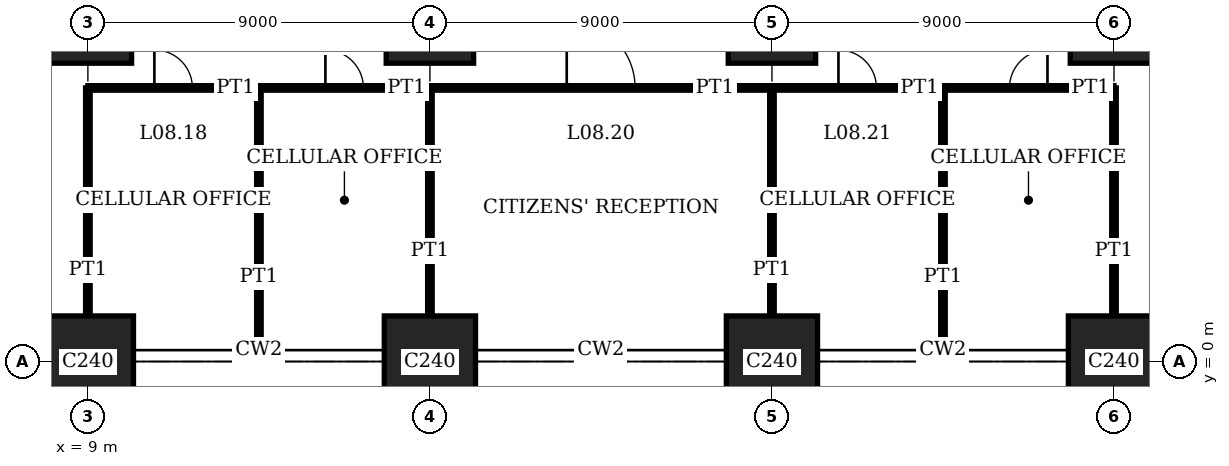
"""IFC4 building model, lengths in metres.
Left out: names, types, materials, properties, quantities, classifications, styles, units other than length and angle.
Written with IfcOpenShell. Run it as: python <this file> out.ifc"""

import sys

from ifc_helpers import new_model, si_unit, direction, frame, frame_2d, origin, origin_2d, place, context, subcontext, project, spatial, rectangle, extrude, element, fill, save


model = new_model("IFC4")
c1 = context("Model", 3, precision=1e-05, world=origin(), true_north=direction((0.0, 1.0)))
c2 = subcontext(c1, "Body", "Model", "MODEL_VIEW")
j1 = project(units=[si_unit("LENGTHUNIT", "METRE"), si_unit("PLANEANGLEUNIT", "RADIAN")], contexts=[c1])
p1 = place(None, origin())
s1 = spatial("IfcSite", under=j1, at=p1, CompositionType="ELEMENT")
p2 = place(p1, origin())
s2 = spatial("IfcBuilding", under=s1, at=p2, CompositionType="ELEMENT")
p3 = place(p2, frame((0.0, 0.0, 35.8)))
s3 = spatial("IfcBuildingStorey", under=s2, at=p3, CompositionType="ELEMENT", Elevation=35.8)
p4 = place(p3, frame((9.0, 0.0, 0.0), z_axis=(0.0, 0.0, 1.0), x_axis=(1.0, 0.0, 0.0)))
e1 = element("IfcColumn", 1, at=p4, inside=s3, PredefinedType="COLUMN", context=c2, shape_type="SweptSolid", body=[
    extrude(rectangle(XDim=2.4, YDim=2.4, at=origin_2d()), origin(), (0.0, 0.0, 1.0), 4.0),
])
p5 = place(p3, frame((9.0, 9.0, 0.0), z_axis=(0.0, 0.0, 1.0), x_axis=(1.0, 0.0, 0.0)))
e2 = element("IfcColumn", 2, at=p5, inside=s3, PredefinedType="COLUMN", context=c2, shape_type="SweptSolid", body=[
    extrude(rectangle(XDim=2.3, YDim=2.3, at=origin_2d()), origin(), (0.0, 0.0, 1.0), 4.0),
])
p6 = place(p3, frame((18.0, 0.0, 0.0), z_axis=(0.0, 0.0, 1.0), x_axis=(1.0, 0.0, 0.0)))
e3 = element("IfcColumn", 3, at=p6, inside=s3, PredefinedType="COLUMN", context=c2, shape_type="SweptSolid", body=[
    extrude(rectangle(XDim=2.4, YDim=2.4, at=origin_2d()), origin(), (0.0, 0.0, 1.0), 4.0),
])
p7 = place(p3, frame((18.0, 9.0, 0.0), z_axis=(0.0, 0.0, 1.0), x_axis=(1.0, 0.0, 0.0)))
e4 = element("IfcColumn", 4, at=p7, inside=s3, PredefinedType="COLUMN", context=c2, shape_type="SweptSolid", body=[
    extrude(rectangle(XDim=2.3, YDim=2.3, at=origin_2d()), origin(), (0.0, 0.0, 1.0), 4.0),
])
p8 = place(p3, frame((27.0, 0.0, 0.0), z_axis=(0.0, 0.0, 1.0), x_axis=(1.0, 0.0, 0.0)))
e5 = element("IfcColumn", 5, at=p8, inside=s3, PredefinedType="COLUMN", context=c2, shape_type="SweptSolid", body=[
    extrude(rectangle(XDim=2.4, YDim=2.4, at=origin_2d()), origin(), (0.0, 0.0, 1.0), 4.0),
])
p9 = place(p3, frame((27.0, 9.0, 0.0), z_axis=(0.0, 0.0, 1.0), x_axis=(1.0, 0.0, 0.0)))
e6 = element("IfcColumn", 6, at=p9, inside=s3, PredefinedType="COLUMN", context=c2, shape_type="SweptSolid", body=[
    extrude(rectangle(XDim=2.3, YDim=2.3, at=origin_2d()), origin(), (0.0, 0.0, 1.0), 4.0),
])
p10 = place(p3, frame((36.0, 0.0, 0.0), z_axis=(0.0, 0.0, 1.0), x_axis=(1.0, 0.0, 0.0)))
e7 = element("IfcColumn", 7, at=p10, inside=s3, PredefinedType="COLUMN", context=c2, shape_type="SweptSolid", body=[
    extrude(rectangle(XDim=2.4, YDim=2.4, at=origin_2d()), origin(), (0.0, 0.0, 1.0), 4.0),
])
p11 = place(p3, frame((36.0, 9.0, 0.0), z_axis=(0.0, 0.0, 1.0), x_axis=(1.0, 0.0, 0.0)))
e8 = element("IfcColumn", 8, at=p11, inside=s3, PredefinedType="COLUMN", context=c2, shape_type="SweptSolid", body=[
    extrude(rectangle(XDim=2.3, YDim=2.3, at=origin_2d()), origin(), (0.0, 0.0, 1.0), 4.0),
])
p12 = place(p3, frame((9.0, 7.2, 0.0), z_axis=(0.0, 0.0, 1.0), x_axis=(1.0, 0.0, 0.0)))
e9 = element("IfcWall", 9, at=p12, inside=s3, PredefinedType="PARTITIONING", context=c2, shape_type="SweptSolid", body=[
    extrude(rectangle(XDim=4.5, YDim=0.12, at=frame_2d((2.25, 0.0))), origin(), (0.0, 0.0, 1.0), 3.75),
])
p13 = place(p12, frame((1.75, 0.0, 0.0)))
e10 = element("IfcOpeningElement", 10, at=p13, cuts=e9, PredefinedType="OPENING", context=c2, shape_type="SweptSolid", body=[
    extrude(rectangle(XDim=1.0, YDim=2.4, at=frame_2d((0.5, 1.2))), frame((0.0, 0.07, 0.0), z_axis=(0.0, -1.0, 0.0), x_axis=(1.0, 0.0, 0.0)), (0.0, 0.0, 1.0), 0.14),
])
p14 = place(p3, frame((13.5, 7.2, 0.0), z_axis=(0.0, 0.0, 1.0), x_axis=(1.0, 0.0, 0.0)))
e11 = element("IfcWall", 11, at=p14, inside=s3, PredefinedType="PARTITIONING", context=c2, shape_type="SweptSolid", body=[
    extrude(rectangle(XDim=4.5, YDim=0.12, at=frame_2d((2.25, 0.0))), origin(), (0.0, 0.0, 1.0), 3.75),
])
p15 = place(p14, frame((1.75, 0.0, 0.0)))
e12 = element("IfcOpeningElement", 12, at=p15, cuts=e11, PredefinedType="OPENING", context=c2, shape_type="SweptSolid", body=[
    extrude(rectangle(XDim=1.0, YDim=2.4, at=frame_2d((0.5, 1.2))), frame((0.0, 0.07, 0.0), z_axis=(0.0, -1.0, 0.0), x_axis=(1.0, 0.0, 0.0)), (0.0, 0.0, 1.0), 0.14),
])
p16 = place(p3, frame((18.0, 7.2, 0.0), z_axis=(0.0, 0.0, 1.0), x_axis=(1.0, 0.0, 0.0)))
e13 = element("IfcWall", 13, at=p16, inside=s3, PredefinedType="PARTITIONING", context=c2, shape_type="SweptSolid", body=[
    extrude(rectangle(XDim=9.0, YDim=0.12, at=frame_2d((4.5, 0.0))), origin(), (0.0, 0.0, 1.0), 3.75),
])
p17 = place(p16, frame((3.6, 0.0, 0.0)))
e14 = element("IfcOpeningElement", 14, at=p17, cuts=e13, PredefinedType="OPENING", context=c2, shape_type="SweptSolid", body=[
    extrude(rectangle(XDim=1.8, YDim=2.4, at=frame_2d((0.9, 1.2))), frame((0.0, 0.07, 0.0), z_axis=(0.0, -1.0, 0.0), x_axis=(1.0, 0.0, 0.0)), (0.0, 0.0, 1.0), 0.14),
])
p18 = place(p3, frame((27.0, 7.2, 0.0), z_axis=(0.0, 0.0, 1.0), x_axis=(1.0, 0.0, 0.0)))
e15 = element("IfcWall", 15, at=p18, inside=s3, PredefinedType="PARTITIONING", context=c2, shape_type="SweptSolid", body=[
    extrude(rectangle(XDim=4.5, YDim=0.12, at=frame_2d((2.25, 0.0))), origin(), (0.0, 0.0, 1.0), 3.75),
])
p19 = place(p18, frame((1.75, 0.0, 0.0)))
e16 = element("IfcOpeningElement", 16, at=p19, cuts=e15, PredefinedType="OPENING", context=c2, shape_type="SweptSolid", body=[
    extrude(rectangle(XDim=1.0, YDim=2.4, at=frame_2d((0.5, 1.2))), frame((0.0, 0.07, 0.0), z_axis=(0.0, -1.0, 0.0), x_axis=(1.0, 0.0, 0.0)), (0.0, 0.0, 1.0), 0.14),
])
p20 = place(p3, frame((31.5, 7.2, 0.0), z_axis=(0.0, 0.0, 1.0), x_axis=(1.0, 0.0, 0.0)))
e17 = element("IfcWall", 17, at=p20, inside=s3, PredefinedType="PARTITIONING", context=c2, shape_type="SweptSolid", body=[
    extrude(rectangle(XDim=4.5, YDim=0.12, at=frame_2d((2.25, 0.0))), origin(), (0.0, 0.0, 1.0), 3.75),
])
p21 = place(p20, frame((1.75, 0.0, 0.0)))
e18 = element("IfcOpeningElement", 18, at=p21, cuts=e17, PredefinedType="OPENING", context=c2, shape_type="SweptSolid", body=[
    extrude(rectangle(XDim=1.0, YDim=2.4, at=frame_2d((0.5, 1.2))), frame((0.0, 0.07, 0.0), z_axis=(0.0, -1.0, 0.0), x_axis=(1.0, 0.0, 0.0)), (0.0, 0.0, 1.0), 0.14),
])
p22 = place(p3, frame((9.0, 1.2, 0.0), z_axis=(0.0, 0.0, 1.0), x_axis=(0.0, 1.0, 0.0)))
e19 = element("IfcWall", 19, at=p22, inside=s3, PredefinedType="PARTITIONING", context=c2, shape_type="SweptSolid", body=[
    extrude(rectangle(XDim=6.0, YDim=0.12, at=frame_2d((3.0, 0.0))), origin(), (0.0, 0.0, 1.0), 3.05),
])
p23 = place(p3, frame((13.5, 0.31, 0.0), z_axis=(0.0, 0.0, 1.0), x_axis=(0.0, 1.0, 0.0)))
e20 = element("IfcWall", 20, at=p23, inside=s3, PredefinedType="PARTITIONING", context=c2, shape_type="SweptSolid", body=[
    extrude(rectangle(XDim=6.89, YDim=0.12, at=frame_2d((3.445, 0.0))), origin(), (0.0, 0.0, 1.0), 3.75),
])
for number, where, z_axis, x_axis in (
    (21, (18.0, 1.2, 0.0), (0.0, 0.0, 1.0), (0.0, 1.0, 0.0)),
    (22, (27.0, 1.2, 0.0), (0.0, 0.0, 1.0), (0.0, 1.0, 0.0)),
):
    element("IfcWall", number, at=place(p3, frame(where, z_axis=z_axis, x_axis=x_axis)), inside=s3, PredefinedType="PARTITIONING", context=c2, shape_type="SweptSolid", body=[
        extrude(rectangle(XDim=6.0, YDim=0.12, at=frame_2d((3.0, 0.0))), origin(), (0.0, 0.0, 1.0), 3.05),
    ])
p24 = place(p3, frame((31.5, 0.31, 0.0), z_axis=(0.0, 0.0, 1.0), x_axis=(0.0, 1.0, 0.0)))
e23 = element("IfcWall", 23, at=p24, inside=s3, PredefinedType="PARTITIONING", context=c2, shape_type="SweptSolid", body=[
    extrude(rectangle(XDim=6.89, YDim=0.12, at=frame_2d((3.445, 0.0))), origin(), (0.0, 0.0, 1.0), 3.75),
])
p25 = place(p3, frame((36.0, 1.2, 0.0), z_axis=(0.0, 0.0, 1.0), x_axis=(0.0, 1.0, 0.0)))
e24 = element("IfcWall", 24, at=p25, inside=s3, PredefinedType="PARTITIONING", context=c2, shape_type="SweptSolid", body=[
    extrude(rectangle(XDim=6.0, YDim=0.12, at=frame_2d((3.0, 0.0))), origin(), (0.0, 0.0, 1.0), 3.05),
])
p26 = place(p13, origin())
e25 = element("IfcDoor", 25, at=p26, inside=s3, OperationType="SINGLE_SWING_RIGHT", PredefinedType="DOOR", context=c2, shape_type="SweptSolid", body=[
    extrude(rectangle(XDim=1.0, YDim=2.4, at=frame_2d((0.5, 1.2))), frame((0.0, 0.025, 0.0), z_axis=(0.0, -1.0, 0.0), x_axis=(1.0, 0.0, 0.0)), (0.0, 0.0, 1.0), 0.05),
])
fill(e10, e25)
p27 = place(p15, origin())
e26 = element("IfcDoor", 26, at=p27, inside=s3, OperationType="SINGLE_SWING_RIGHT", PredefinedType="DOOR", context=c2, shape_type="SweptSolid", body=[
    extrude(rectangle(XDim=1.0, YDim=2.4, at=frame_2d((0.5, 1.2))), frame((0.0, 0.025, 0.0), z_axis=(0.0, -1.0, 0.0), x_axis=(1.0, 0.0, 0.0)), (0.0, 0.0, 1.0), 0.05),
])
fill(e12, e26)
p28 = place(p17, origin())
e27 = element("IfcDoor", 27, at=p28, inside=s3, OperationType="DOUBLE_DOOR_SINGLE_SWING", PredefinedType="DOOR", context=c2, shape_type="SweptSolid", body=[
    extrude(rectangle(XDim=1.8, YDim=2.4, at=frame_2d((0.9, 1.2))), frame((0.0, 0.025, 0.0), z_axis=(0.0, -1.0, 0.0), x_axis=(1.0, 0.0, 0.0)), (0.0, 0.0, 1.0), 0.05),
])
fill(e14, e27)
p29 = place(p19, origin())
e28 = element("IfcDoor", 28, at=p29, inside=s3, OperationType="SINGLE_SWING_RIGHT", PredefinedType="DOOR", context=c2, shape_type="SweptSolid", body=[
    extrude(rectangle(XDim=1.0, YDim=2.4, at=frame_2d((0.5, 1.2))), frame((0.0, 0.025, 0.0), z_axis=(0.0, -1.0, 0.0), x_axis=(1.0, 0.0, 0.0)), (0.0, 0.0, 1.0), 0.05),
])
fill(e16, e28)
p30 = place(p21, origin())
e29 = element("IfcDoor", 29, at=p30, inside=s3, OperationType="SINGLE_SWING_LEFT", PredefinedType="DOOR", context=c2, shape_type="SweptSolid", body=[
    extrude(rectangle(XDim=1.0, YDim=2.4, at=frame_2d((0.5, 1.2))), frame((0.0, 0.025, 0.0), z_axis=(0.0, -1.0, 0.0), x_axis=(1.0, 0.0, 0.0)), (0.0, 0.0, 1.0), 0.05),
])
fill(e18, e29)
save(model, sys.argv[1])
